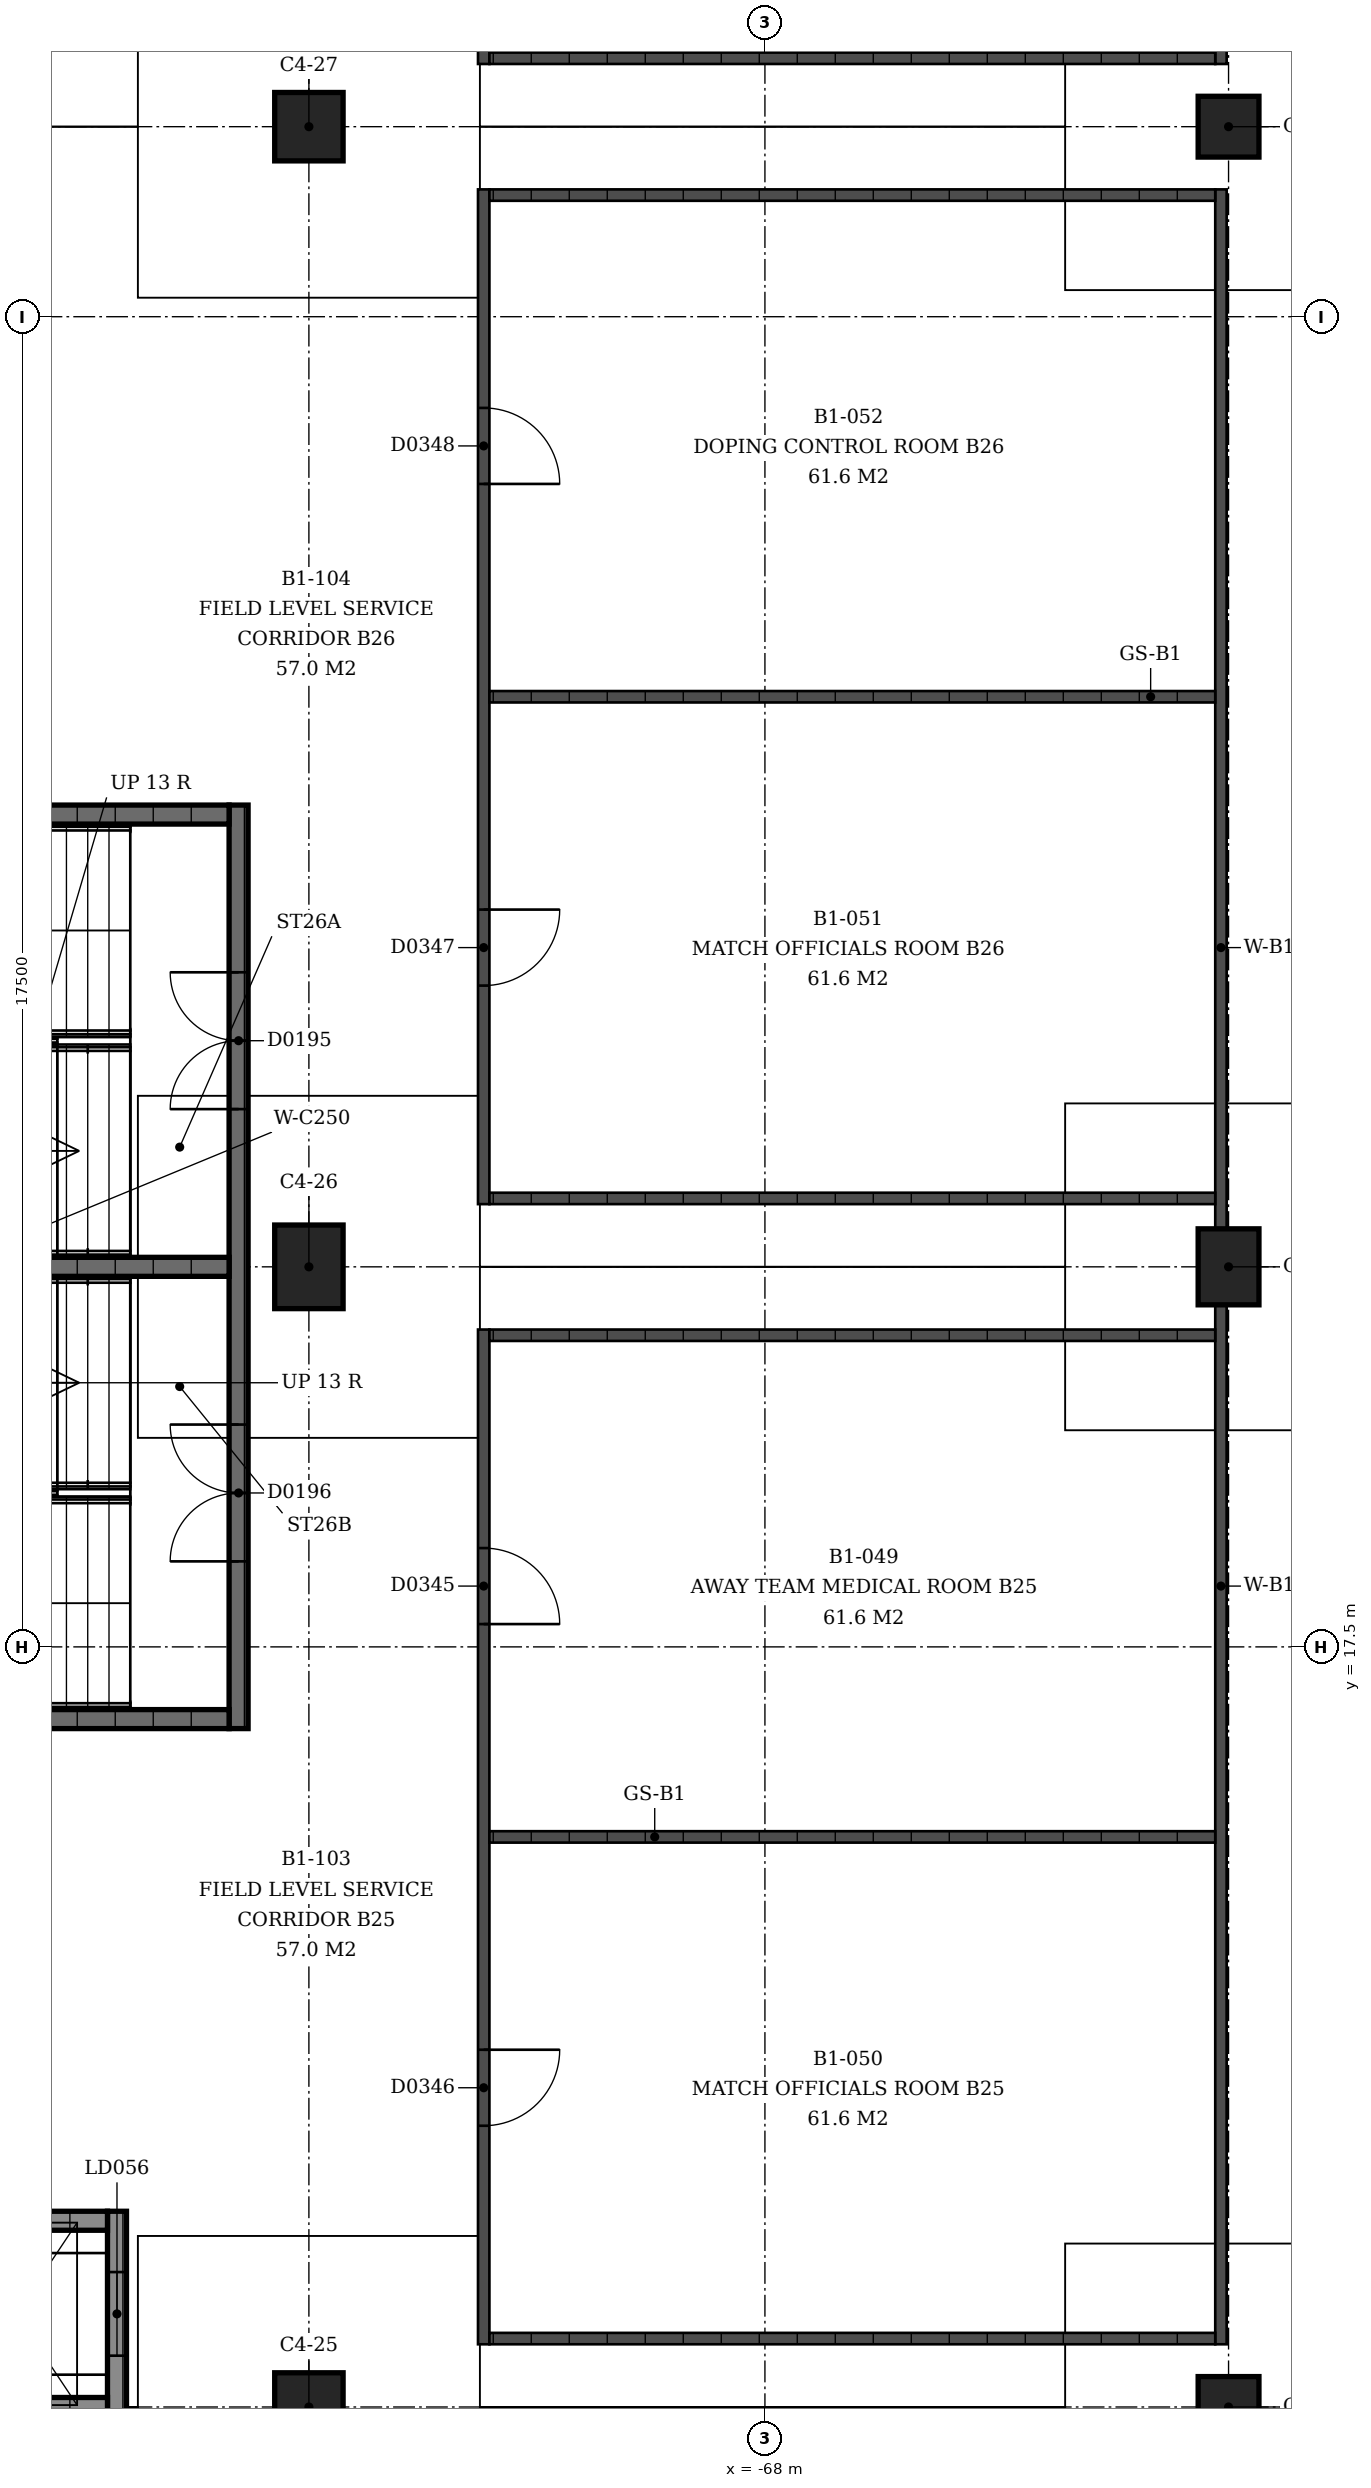
"""IFC4 building model, lengths in metres.
Left out: names, types, materials, properties, quantities, classifications, styles, units other than length and angle.
Written with IfcOpenShell. Run it as: python <this file> out.ifc"""

import sys

from ifc_helpers import new_model, si_unit, direction, frame, frame_2d, origin, origin_2d, place, context, subcontext, project, spatial, rectangle, extrude, element, fill, save


model = new_model("IFC4")
c1 = context("Model", 3, precision=1e-05, world=origin(), true_north=direction((0.0, 1.0)))
c2 = subcontext(c1, "Body", "Model", "MODEL_VIEW")
j1 = project(units=[si_unit("LENGTHUNIT", "METRE"), si_unit("PLANEANGLEUNIT", "RADIAN")], contexts=[c1])
p1 = place(None, origin())
s1 = spatial("IfcSite", under=j1, at=p1, CompositionType="ELEMENT")
p2 = place(p1, origin())
s2 = spatial("IfcBuilding", under=s1, at=p2, CompositionType="ELEMENT")
p3 = place(p2, frame((0.0, 0.0, -4.5)))
s3 = spatial("IfcBuildingStorey", under=s2, at=p3, CompositionType="ELEMENT", Elevation=-4.5)
p4 = place(p3, frame((-61.9, 7.5, 0.0), z_axis=(0.0, 0.0, 1.0), x_axis=(0.0, -1.0, 0.0)))
e1 = element("IfcColumn", 1, at=p4, inside=s3, PredefinedType="COLUMN", context=c2, shape_type="SweptSolid", body=[
    extrude(rectangle(XDim=0.8, YDim=0.8, at=origin_2d()), origin(), (0.0, 0.0, 1.0), 4.5),
])
p5 = place(p3, frame((-74.0, 7.5, 0.0), z_axis=(0.0, 0.0, 1.0), x_axis=(0.0, -1.0, 0.0)))
e2 = element("IfcColumn", 2, at=p5, inside=s3, PredefinedType="COLUMN", context=c2, shape_type="SweptSolid", body=[
    extrude(rectangle(XDim=0.9, YDim=0.9, at=origin_2d()), origin(), (0.0, 0.0, 1.0), 4.5),
])
p6 = place(p3, frame((-61.9, 22.5, 0.0), z_axis=(0.0, 0.0, 1.0), x_axis=(0.0, -1.0, 0.0)))
e3 = element("IfcColumn", 3, at=p6, inside=s3, PredefinedType="COLUMN", context=c2, shape_type="SweptSolid", body=[
    extrude(rectangle(XDim=1.0, YDim=0.8, at=origin_2d()), origin(), (0.0, 0.0, 1.0), 4.5),
])
p7 = place(p3, frame((-74.0, 22.5, 0.0), z_axis=(0.0, 0.0, 1.0), x_axis=(0.0, -1.0, 0.0)))
e4 = element("IfcColumn", 4, at=p7, inside=s3, PredefinedType="COLUMN", context=c2, shape_type="SweptSolid", body=[
    extrude(rectangle(XDim=1.1, YDim=0.9, at=origin_2d()), origin(), (0.0, 0.0, 1.0), 4.5),
])
p8 = place(p3, frame((-61.9, 37.5, 0.0), z_axis=(0.0, 0.0, 1.0), x_axis=(0.0, -1.0, 0.0)))
e5 = element("IfcColumn", 5, at=p8, inside=s3, PredefinedType="COLUMN", context=c2, shape_type="SweptSolid", body=[
    extrude(rectangle(XDim=0.8, YDim=0.8, at=origin_2d()), origin(), (0.0, 0.0, 1.0), 4.5),
])
p9 = place(p3, frame((-74.0, 37.5, 0.0), z_axis=(0.0, 0.0, 1.0), x_axis=(0.0, -1.0, 0.0)))
e6 = element("IfcColumn", 6, at=p9, inside=s3, PredefinedType="COLUMN", context=c2, shape_type="SweptSolid", body=[
    extrude(rectangle(XDim=0.9, YDim=0.9, at=origin_2d()), origin(), (0.0, 0.0, 1.0), 4.5),
])
p10 = place(p3, frame((-74.925, 28.575, 0.0), z_axis=(0.0, 0.0, 1.0), x_axis=(0.0, -1.0, 0.0)))
e7 = element("IfcWall", 7, at=p10, inside=s3, PredefinedType="SHEAR", context=c2, shape_type="SweptSolid", body=[
    extrude(rectangle(XDim=12.15, YDim=0.25, at=frame_2d((6.075, 0.0))), origin(), (0.0, 0.0, 1.0), 4.09),
])
p11 = place(p10, frame((2.2, 0.0, 0.0)))
e8 = element("IfcOpeningElement", 8, at=p11, cuts=e7, PredefinedType="OPENING", context=c2, shape_type="SweptSolid", body=[
    extrude(rectangle(XDim=1.8, YDim=2.1, at=frame_2d((0.9, 1.05))), frame((0.0, 0.125, 0.0), z_axis=(0.0, -1.0, 0.0), x_axis=(1.0, 0.0, 0.0)), (0.0, 0.0, 1.0), 0.25),
])
p12 = place(p10, frame((8.15, 0.0, 0.0)))
e9 = element("IfcOpeningElement", 9, at=p12, cuts=e7, PredefinedType="OPENING", context=c2, shape_type="SweptSolid", body=[
    extrude(rectangle(XDim=1.8, YDim=2.1, at=frame_2d((0.9, 1.05))), frame((0.0, 0.125, 0.0), z_axis=(0.0, -1.0, 0.0), x_axis=(1.0, 0.0, 0.0)), (0.0, 0.0, 1.0), 0.25),
])
for number, where, z_axis, x_axis in (
    (10, (-75.05, 28.45, 0.0), (0.0, 0.0, 1.0), (-1.0, 0.0, 0.0)),
    (11, (-75.05, 16.55, 0.0), (0.0, 0.0, 1.0), (-1.0, 0.0, 0.0)),
    (12, (-75.05, 22.5, 0.0), (0.0, 0.0, 1.0), (-1.0, 0.0, 0.0)),
):
    element("IfcWall", number, at=place(p3, frame(where, z_axis=z_axis, x_axis=x_axis)), inside=s3, PredefinedType="SHEAR", context=c2, shape_type="SweptSolid", body=[
        extrude(rectangle(XDim=7.46, YDim=0.25, at=frame_2d((3.73, 0.0))), origin(), (0.0, 0.0, 1.0), 4.09),
    ])
p13 = place(p3, frame((-76.525, 10.075, -1.2), z_axis=(0.0, 0.0, 1.0), x_axis=(0.0, -1.0, 0.0)))
e13 = element("IfcWall", 13, at=p13, inside=s3, PredefinedType="SHEAR", context=c2, shape_type="SweptSolid", body=[
    extrude(rectangle(XDim=5.15, YDim=0.25, at=frame_2d((2.575, 0.0))), origin(), (0.0, 0.0, 1.0), 5.29),
])
p14 = place(p13, frame((0.8, 0.0, 1.2)))
e14 = element("IfcOpeningElement", 14, at=p14, cuts=e13, PredefinedType="OPENING", context=c2, shape_type="SweptSolid", body=[
    extrude(rectangle(XDim=1.1, YDim=2.1, at=frame_2d((0.55, 1.05))), frame((0.0, 0.125, 0.0), z_axis=(0.0, -1.0, 0.0), x_axis=(1.0, 0.0, 0.0)), (0.0, 0.0, 1.0), 0.25),
])
p15 = place(p13, frame((3.25, 0.0, 1.2)))
e15 = element("IfcOpeningElement", 15, at=p15, cuts=e13, PredefinedType="OPENING", context=c2, shape_type="SweptSolid", body=[
    extrude(rectangle(XDim=1.1, YDim=2.1, at=frame_2d((0.55, 1.05))), frame((0.0, 0.125, 0.0), z_axis=(0.0, -1.0, 0.0), x_axis=(1.0, 0.0, 0.0)), (0.0, 0.0, 1.0), 0.25),
])
for number, where, z_axis, x_axis in (
    (16, (-76.65, 9.95, -1.2), (0.0, 0.0, 1.0), (-1.0, 0.0, 0.0)),
    (17, (-76.65, 7.5, -1.2), (0.0, 0.0, 1.0), (-1.0, 0.0, 0.0)),
):
    element("IfcWall", number, at=place(p3, frame(where, z_axis=z_axis, x_axis=x_axis)), inside=s3, PredefinedType="SHEAR", context=c2, shape_type="SweptSolid", body=[
        extrude(rectangle(XDim=3.0, YDim=0.25, at=frame_2d((1.5, 0.0))), origin(), (0.0, 0.0, 1.0), 5.29),
    ])
p16 = place(p3, frame((-62.0, 22.0, 0.0), z_axis=(0.0, 0.0, 1.0), x_axis=(0.0, -1.0, 0.0)))
e18 = element("IfcWall", 18, at=p16, inside=s3, PredefinedType="SOLIDWALL", context=c2, shape_type="SweptSolid", body=[
    extrude(rectangle(XDim=13.675, YDim=0.15, at=frame_2d((6.837, 0.0))), origin(), (0.0, 0.0, 1.0), 3.0),
])
p17 = place(p3, frame((-71.7, 21.675, 0.0), z_axis=(0.0, 0.0, 1.0), x_axis=(0.0, -1.0, 0.0)))
e19 = element("IfcWall", 19, at=p17, inside=s3, PredefinedType="SOLIDWALL", context=c2, shape_type="SweptSolid", body=[
    extrude(rectangle(XDim=13.35, YDim=0.15, at=frame_2d((6.675, 0.0))), origin(), (0.0, 0.0, 1.0), 3.0),
])
p18 = place(p17, frame((2.875, 0.0, 0.0)))
e20 = element("IfcOpeningElement", 20, at=p18, cuts=e19, PredefinedType="OPENING", context=c2, shape_type="SweptSolid", body=[
    extrude(rectangle(XDim=1.0, YDim=2.1, at=frame_2d((0.5, 1.05))), frame((0.0, 0.075, 0.0), z_axis=(0.0, -1.0, 0.0), x_axis=(1.0, 0.0, 0.0)), (0.0, 0.0, 1.0), 0.15),
])
p19 = place(p17, frame((9.475, 0.0, 0.0)))
e21 = element("IfcOpeningElement", 21, at=p19, cuts=e19, PredefinedType="OPENING", context=c2, shape_type="SweptSolid", body=[
    extrude(rectangle(XDim=1.0, YDim=2.1, at=frame_2d((0.5, 1.05))), frame((0.0, 0.075, 0.0), z_axis=(0.0, -1.0, 0.0), x_axis=(1.0, 0.0, 0.0)), (0.0, 0.0, 1.0), 0.15),
])
for number, where, z_axis, x_axis in (
    (22, (-62.075, 21.6, 0.0), (0.0, 0.0, 1.0), (-1.0, 0.0, 0.0)),
    (23, (-62.075, 15.0, 0.0), (0.0, 0.0, 1.0), (-1.0, 0.0, 0.0)),
    (24, (-62.075, 8.4, 0.0), (0.0, 0.0, 1.0), (-1.0, 0.0, 0.0)),
):
    element("IfcWall", number, at=place(p3, frame(where, z_axis=z_axis, x_axis=x_axis)), inside=s3, PredefinedType="SOLIDWALL", context=c2, shape_type="SweptSolid", body=[
        extrude(rectangle(XDim=9.55, YDim=0.15, at=frame_2d((4.775, 0.0))), origin(), (0.0, 0.0, 1.0), 3.0),
    ])
p20 = place(p3, frame((-62.0, 23.0, 0.0), z_axis=(0.0, 0.0, 1.0), x_axis=(0.0, 1.0, 0.0)))
e25 = element("IfcWall", 25, at=p20, inside=s3, PredefinedType="SOLIDWALL", context=c2, shape_type="SweptSolid", body=[
    extrude(rectangle(XDim=13.675, YDim=0.15, at=frame_2d((6.837, 0.0))), origin(), (0.0, 0.0, 1.0), 3.0),
])
p21 = place(p3, frame((-71.7, 23.325, 0.0), z_axis=(0.0, 0.0, 1.0), x_axis=(0.0, 1.0, 0.0)))
e26 = element("IfcWall", 26, at=p21, inside=s3, PredefinedType="SOLIDWALL", context=c2, shape_type="SweptSolid", body=[
    extrude(rectangle(XDim=13.35, YDim=0.15, at=frame_2d((6.675, 0.0))), origin(), (0.0, 0.0, 1.0), 3.0),
])
p22 = place(p21, frame((2.875, 0.0, 0.0)))
e27 = element("IfcOpeningElement", 27, at=p22, cuts=e26, PredefinedType="OPENING", context=c2, shape_type="SweptSolid", body=[
    extrude(rectangle(XDim=1.0, YDim=2.1, at=frame_2d((0.5, 1.05))), frame((0.0, 0.075, 0.0), z_axis=(0.0, -1.0, 0.0), x_axis=(1.0, 0.0, 0.0)), (0.0, 0.0, 1.0), 0.15),
])
p23 = place(p21, frame((9.475, 0.0, 0.0)))
e28 = element("IfcOpeningElement", 28, at=p23, cuts=e26, PredefinedType="OPENING", context=c2, shape_type="SweptSolid", body=[
    extrude(rectangle(XDim=1.0, YDim=2.1, at=frame_2d((0.5, 1.05))), frame((0.0, 0.075, 0.0), z_axis=(0.0, -1.0, 0.0), x_axis=(1.0, 0.0, 0.0)), (0.0, 0.0, 1.0), 0.15),
])
for number, where, z_axis, x_axis in (
    (29, (-62.075, 23.4, 0.0), (0.0, 0.0, 1.0), (-1.0, 0.0, 0.0)),
    (30, (-62.075, 30.0, 0.0), (0.0, 0.0, 1.0), (-1.0, 0.0, 0.0)),
    (31, (-62.075, 36.6, 0.0), (0.0, 0.0, 1.0), (-1.0, 0.0, 0.0)),
):
    element("IfcWall", number, at=place(p3, frame(where, z_axis=z_axis, x_axis=x_axis)), inside=s3, PredefinedType="SOLIDWALL", context=c2, shape_type="SweptSolid", body=[
        extrude(rectangle(XDim=9.55, YDim=0.15, at=frame_2d((4.775, 0.0))), origin(), (0.0, 0.0, 1.0), 3.0),
    ])
p24 = place(p3, frame((-62.0, 52.0, 0.0), z_axis=(0.0, 0.0, 1.0), x_axis=(0.0, -1.0, 0.0)))
e32 = element("IfcWall", 32, at=p24, inside=s3, PredefinedType="SOLIDWALL", context=c2, shape_type="SweptSolid", body=[
    extrude(rectangle(XDim=13.675, YDim=0.15, at=frame_2d((6.837, 0.0))), origin(), (0.0, 0.0, 1.0), 3.0),
])
p25 = place(p3, frame((-71.7, 51.675, 0.0), z_axis=(0.0, 0.0, 1.0), x_axis=(0.0, -1.0, 0.0)))
e33 = element("IfcWall", 33, at=p25, inside=s3, PredefinedType="SOLIDWALL", context=c2, shape_type="SweptSolid", body=[
    extrude(rectangle(XDim=13.35, YDim=0.15, at=frame_2d((6.675, 0.0))), origin(), (0.0, 0.0, 1.0), 3.0),
])
p26 = place(p25, frame((2.875, 0.0, 0.0)))
e34 = element("IfcOpeningElement", 34, at=p26, cuts=e33, PredefinedType="OPENING", context=c2, shape_type="SweptSolid", body=[
    extrude(rectangle(XDim=1.0, YDim=2.1, at=frame_2d((0.5, 1.05))), frame((0.0, 0.075, 0.0), z_axis=(0.0, -1.0, 0.0), x_axis=(1.0, 0.0, 0.0)), (0.0, 0.0, 1.0), 0.15),
])
p27 = place(p25, frame((9.475, 0.0, 0.0)))
e35 = element("IfcOpeningElement", 35, at=p27, cuts=e33, PredefinedType="OPENING", context=c2, shape_type="SweptSolid", body=[
    extrude(rectangle(XDim=1.0, YDim=2.1, at=frame_2d((0.5, 1.05))), frame((0.0, 0.075, 0.0), z_axis=(0.0, -1.0, 0.0), x_axis=(1.0, 0.0, 0.0)), (0.0, 0.0, 1.0), 0.15),
])
p28 = place(p3, frame((-62.075, 38.4, 0.0), z_axis=(0.0, 0.0, 1.0), x_axis=(-1.0, 0.0, 0.0)))
e36 = element("IfcWall", 36, at=p28, inside=s3, PredefinedType="SOLIDWALL", context=c2, shape_type="SweptSolid", body=[
    extrude(rectangle(XDim=9.55, YDim=0.15, at=frame_2d((4.775, 0.0))), origin(), (0.0, 0.0, 1.0), 3.0),
])
p29 = place(p11, origin())
e37 = element("IfcDoor", 37, at=p29, inside=s3, OperationType="DOUBLE_DOOR_SINGLE_SWING", PredefinedType="DOOR", context=c2, shape_type="SweptSolid", body=[
    extrude(rectangle(XDim=1.8, YDim=2.1, at=frame_2d((0.9, 1.05))), frame((0.0, 0.025, 0.0), z_axis=(0.0, -1.0, 0.0), x_axis=(1.0, 0.0, 0.0)), (0.0, 0.0, 1.0), 0.05),
])
fill(e8, e37)
p30 = place(p12, origin())
e38 = element("IfcDoor", 38, at=p30, inside=s3, OperationType="DOUBLE_DOOR_SINGLE_SWING", PredefinedType="DOOR", context=c2, shape_type="SweptSolid", body=[
    extrude(rectangle(XDim=1.8, YDim=2.1, at=frame_2d((0.9, 1.05))), frame((0.0, 0.025, 0.0), z_axis=(0.0, -1.0, 0.0), x_axis=(1.0, 0.0, 0.0)), (0.0, 0.0, 1.0), 0.05),
])
fill(e9, e38)
p31 = place(p14, origin())
e39 = element("IfcDoor", 39, at=p31, inside=s3, OperationType="SLIDING_TO_LEFT", PredefinedType="DOOR", context=c2, shape_type="SweptSolid", body=[
    extrude(rectangle(XDim=1.1, YDim=2.1, at=frame_2d((0.55, 1.05))), frame((0.0, 0.025, 0.0), z_axis=(0.0, -1.0, 0.0), x_axis=(1.0, 0.0, 0.0)), (0.0, 0.0, 1.0), 0.05),
])
fill(e14, e39)
p32 = place(p18, origin())
e40 = element("IfcDoor", 40, at=p32, inside=s3, OperationType="SINGLE_SWING_LEFT", PredefinedType="DOOR", context=c2, shape_type="SweptSolid", body=[
    extrude(rectangle(XDim=1.0, YDim=2.1, at=frame_2d((0.5, 1.05))), frame((0.0, 0.025, 0.0), z_axis=(0.0, -1.0, 0.0), x_axis=(1.0, 0.0, 0.0)), (0.0, 0.0, 1.0), 0.05),
])
fill(e20, e40)
p33 = place(p19, origin())
e41 = element("IfcDoor", 41, at=p33, inside=s3, OperationType="SINGLE_SWING_RIGHT", PredefinedType="DOOR", context=c2, shape_type="SweptSolid", body=[
    extrude(rectangle(XDim=1.0, YDim=2.1, at=frame_2d((0.5, 1.05))), frame((0.0, 0.025, 0.0), z_axis=(0.0, -1.0, 0.0), x_axis=(1.0, 0.0, 0.0)), (0.0, 0.0, 1.0), 0.05),
])
fill(e21, e41)
p34 = place(p22, origin())
e42 = element("IfcDoor", 42, at=p34, inside=s3, OperationType="SINGLE_SWING_RIGHT", PredefinedType="DOOR", context=c2, shape_type="SweptSolid", body=[
    extrude(rectangle(XDim=1.0, YDim=2.1, at=frame_2d((0.5, 1.05))), frame((0.0, 0.025, 0.0), z_axis=(0.0, -1.0, 0.0), x_axis=(1.0, 0.0, 0.0)), (0.0, 0.0, 1.0), 0.05),
])
fill(e27, e42)
p35 = place(p23, origin())
e43 = element("IfcDoor", 43, at=p35, inside=s3, OperationType="SINGLE_SWING_LEFT", PredefinedType="DOOR", context=c2, shape_type="SweptSolid", body=[
    extrude(rectangle(XDim=1.0, YDim=2.1, at=frame_2d((0.5, 1.05))), frame((0.0, 0.025, 0.0), z_axis=(0.0, -1.0, 0.0), x_axis=(1.0, 0.0, 0.0)), (0.0, 0.0, 1.0), 0.05),
])
fill(e28, e43)
save(model, sys.argv[1])
